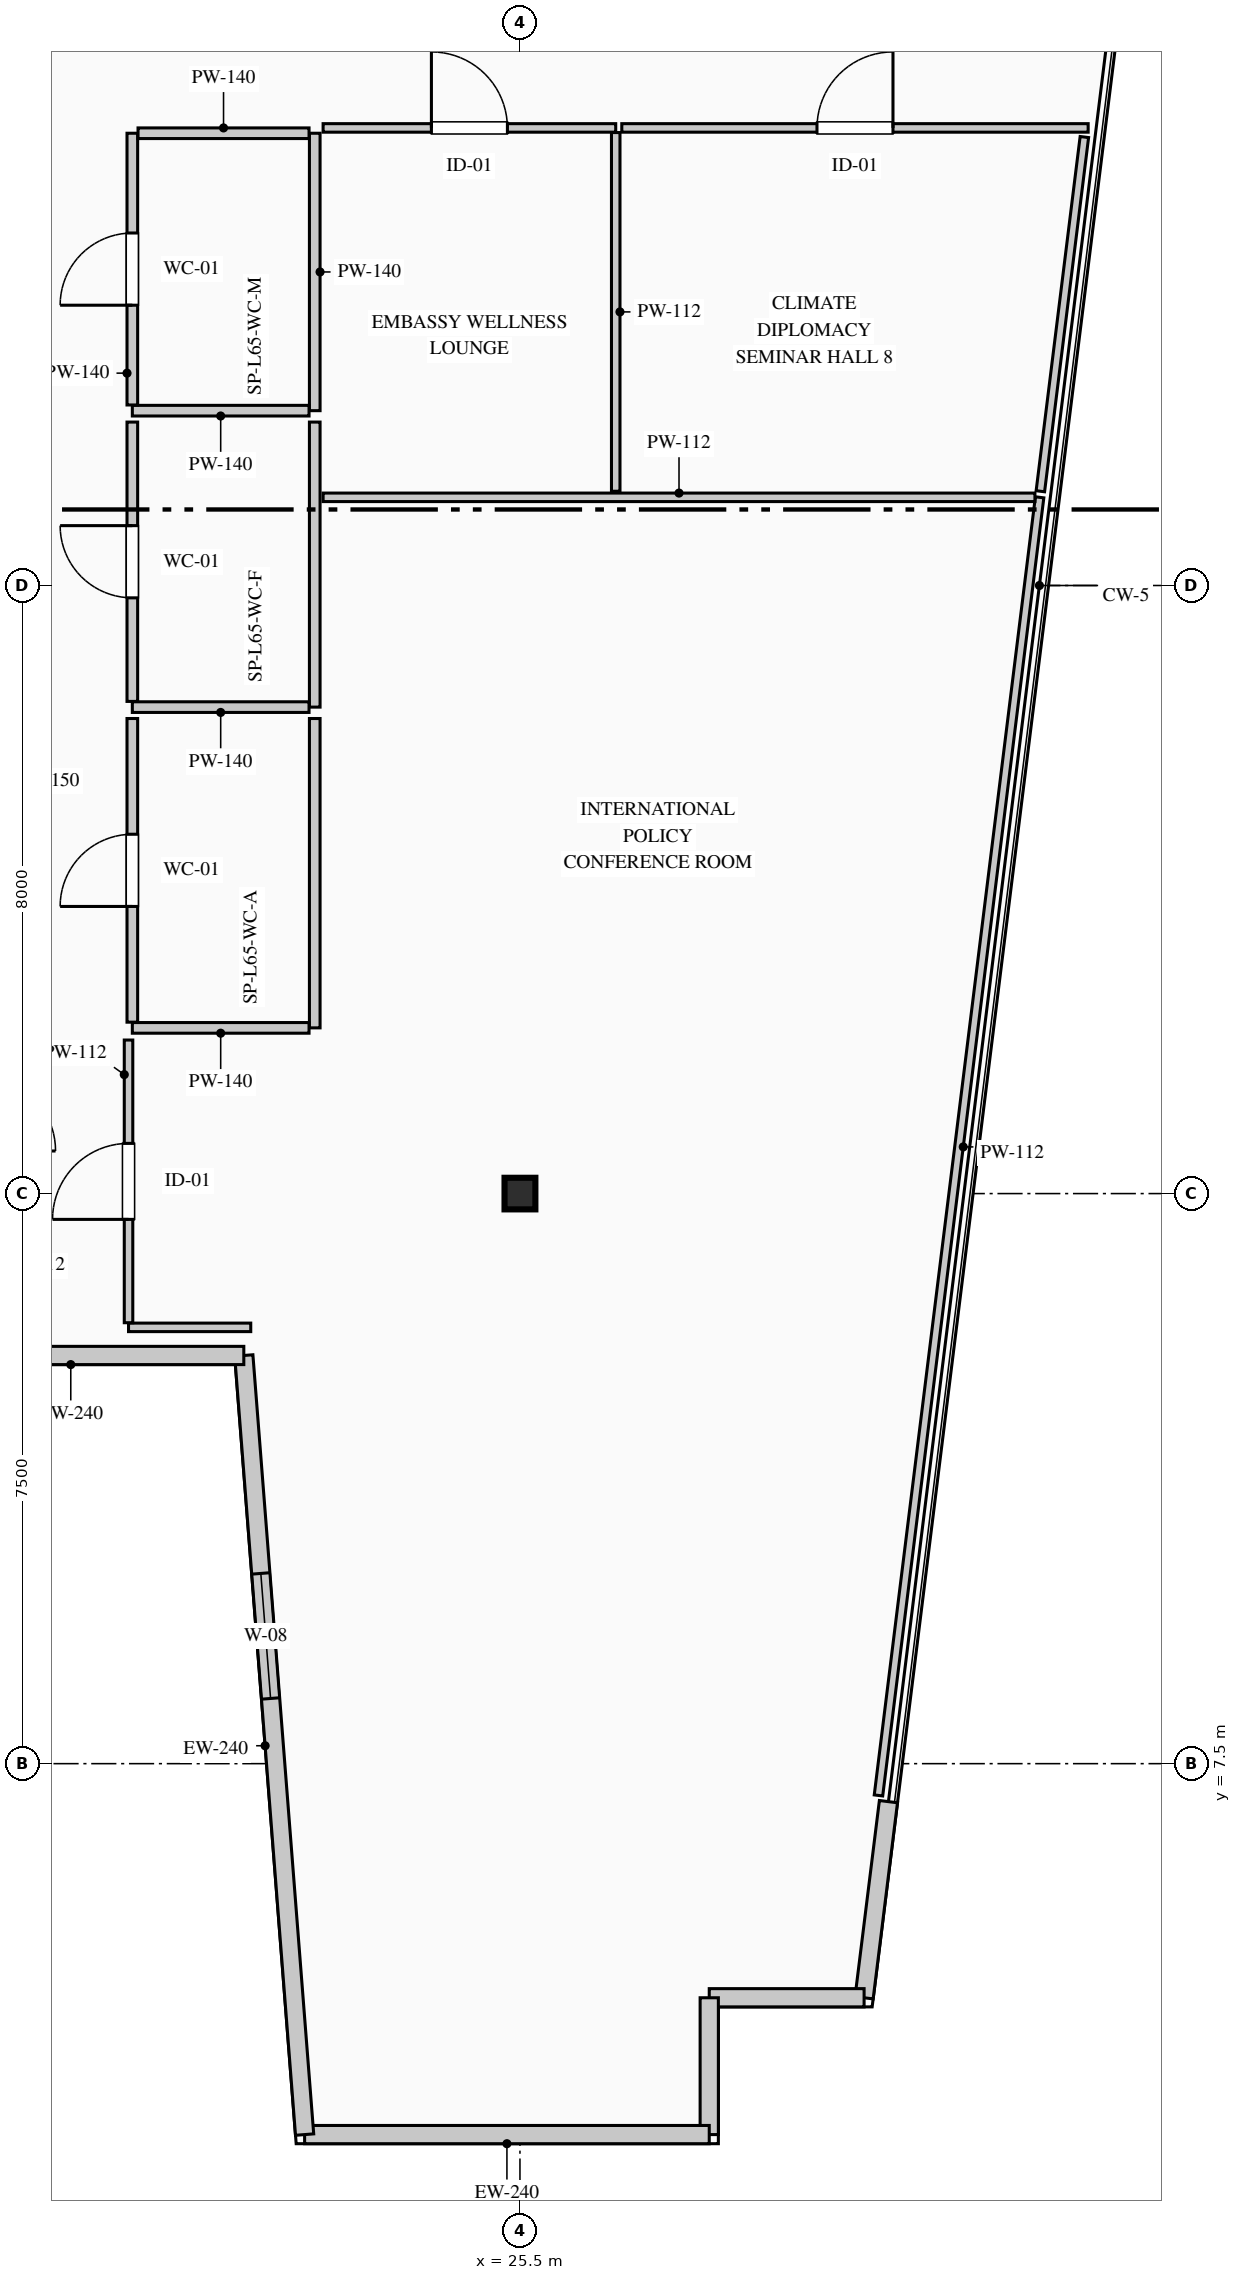
"""IFC4 building model, lengths in metres.
Left out: names, types, materials, properties, quantities, classifications, styles, units other than length and angle.
Written with IfcOpenShell. Run it as: python <this file> out.ifc"""

import sys

from ifc_helpers import new_model, si_unit, direction, frame, frame_2d, origin, origin_2d, place, context, subcontext, project, spatial, rectangle, i_section, extrude, element, fill, save


model = new_model("IFC4")
c1 = context("Model", 3, precision=1e-05, world=origin(), true_north=direction((0.0, 1.0)))
c2 = subcontext(c1, "Body", "Model", "MODEL_VIEW")
j1 = project(units=[si_unit("LENGTHUNIT", "METRE"), si_unit("PLANEANGLEUNIT", "RADIAN")], contexts=[c1])
p1 = place(None, origin())
s1 = spatial("IfcSite", under=j1, at=p1, CompositionType="ELEMENT")
p2 = place(p1, origin())
s2 = spatial("IfcBuilding", under=s1, at=p2, CompositionType="ELEMENT")
p3 = place(p2, frame((0.0, 0.0, 272.5)))
s3 = spatial("IfcBuildingStorey", under=s2, at=p3, CompositionType="ELEMENT", Elevation=272.5)
p4 = place(p3, frame((25.5, 15.0, 0.0), z_axis=(0.0, 0.0, 1.0), x_axis=(1.0, 0.0, 0.0)))
e1 = element("IfcColumn", 1, at=p4, inside=s3, PredefinedType="COLUMN", context=c2, shape_type="SweptSolid", body=[
    extrude(i_section(OverallWidth=0.406, OverallDepth=0.416, WebThickness=0.03, FlangeThickness=0.048, FilletRadius=0.015, at=origin_2d()), origin(), (0.0, 0.0, 1.0), 3.95),
])
p5 = place(p3, frame((30.348, 7.0, 0.0), z_axis=(0.0, 0.0, 1.0), x_axis=(-0.123191073593, -0.992382970121, 0.0)))
e2 = element("IfcWall", 2, at=p5, inside=s3, PredefinedType="STANDARD", context=c2, shape_type="SweptSolid", body=[
    extrude(rectangle(XDim=2.6, YDim=0.24, at=frame_2d((1.3, 0.0))), origin(), (0.0, 0.0, 1.0), 3.7),
])
p6 = place(p3, frame((30.028, 4.42, 0.0), z_axis=(0.0, 0.0, 1.0), x_axis=(-1.0, 0.0, 0.0)))
e3 = element("IfcWall", 3, at=p6, inside=s3, PredefinedType="STANDARD", context=c2, shape_type="SweptSolid", body=[
    extrude(rectangle(XDim=2.037, YDim=0.24, at=frame_2d((1.019, 0.0))), origin(), (0.0, 0.0, 1.0), 3.7),
])
p7 = place(p3, frame((27.99, 4.42, 0.0), z_axis=(0.0, 0.0, 1.0), x_axis=(0.0, -1.0, 0.0)))
e4 = element("IfcWall", 4, at=p7, inside=s3, PredefinedType="STANDARD", context=c2, shape_type="SweptSolid", body=[
    extrude(rectangle(XDim=1.8, YDim=0.24, at=frame_2d((0.9, 0.0))), origin(), (0.0, 0.0, 1.0), 3.7),
])
p8 = place(p3, frame((27.99, 2.62, 0.0), z_axis=(0.0, 0.0, 1.0), x_axis=(-1.0, 0.0, 0.0)))
e5 = element("IfcWall", 5, at=p8, inside=s3, PredefinedType="STANDARD", context=c2, shape_type="SweptSolid", body=[
    extrude(rectangle(XDim=5.324, YDim=0.24, at=frame_2d((2.662, 0.0))), origin(), (0.0, 0.0, 1.0), 3.7),
])
p9 = place(p3, frame((22.667, 2.62, 0.0), z_axis=(0.0, 0.0, 1.0), x_axis=(-0.077816860153, 0.996967670627, 0.0)))
e6 = element("IfcWall", 6, at=p9, inside=s3, PredefinedType="STANDARD", context=c2, shape_type="SweptSolid", body=[
    extrude(rectangle(XDim=10.281, YDim=0.24, at=frame_2d((5.141, 0.0))), origin(), (0.0, 0.0, 1.0), 3.7),
])
p10 = place(p9, frame((5.755, 0.0, 0.9)))
e7 = element("IfcOpeningElement", 7, at=p10, cuts=e6, PredefinedType="OPENING", context=c2, shape_type="SweptSolid", body=[
    extrude(rectangle(XDim=1.65, YDim=1.95, at=frame_2d((0.825, 0.975))), frame((0.0, 0.13, 0.0), z_axis=(0.0, -1.0, 0.0), x_axis=(1.0, 0.0, 0.0)), (0.0, 0.0, 1.0), 0.26),
])
p11 = place(p3, frame((21.867, 12.87, 0.0), z_axis=(0.0, 0.0, 1.0), x_axis=(-1.0, 0.0, 0.0)))
e8 = element("IfcWall", 8, at=p11, inside=s3, PredefinedType="STANDARD", context=c2, shape_type="SweptSolid", body=[
    extrude(rectangle(XDim=4.553, YDim=0.24, at=frame_2d((2.277, 0.0))), origin(), (0.0, 0.0, 1.0), 3.7),
])
p12 = place(p3, frame((22.8, 28.95, 0.0), z_axis=(0.0, 0.0, 1.0), x_axis=(0.0, -1.0, 0.0)))
e9 = element("IfcWall", 9, at=p12, inside=s3, PredefinedType="PARTITIONING", context=c2, shape_type="SweptSolid", body=[
    extrude(rectangle(XDim=3.65, YDim=0.14, at=frame_2d((1.825, 0.0))), origin(), (0.0, 0.0, 1.0), 3.285),
])
p13 = place(p3, frame((22.725, 25.3, 0.0), z_axis=(0.0, 0.0, 1.0), x_axis=(-1.0, 0.0, 0.0)))
e10 = element("IfcWall", 10, at=p13, inside=s3, PredefinedType="PARTITIONING", context=c2, shape_type="SweptSolid", body=[
    extrude(rectangle(XDim=2.325, YDim=0.14, at=frame_2d((1.163, 0.0))), origin(), (0.0, 0.0, 1.0), 3.7),
])
p14 = place(p3, frame((20.4, 25.375, 0.0), z_axis=(0.0, 0.0, 1.0), x_axis=(0.0, 1.0, 0.0)))
e11 = element("IfcWall", 11, at=p14, inside=s3, PredefinedType="PARTITIONING", context=c2, shape_type="SweptSolid", body=[
    extrude(rectangle(XDim=3.575, YDim=0.14, at=frame_2d((1.788, 0.0))), origin(), (0.0, 0.0, 1.0), 3.7),
])
p15 = place(p14, frame((1.312, 0.0, 0.0)))
e12 = element("IfcOpeningElement", 12, at=p15, cuts=e11, PredefinedType="OPENING", context=c2, shape_type="SweptSolid", body=[
    extrude(rectangle(XDim=0.95, YDim=2.15, at=frame_2d((0.475, 1.075))), frame((0.0, 0.08, 0.0), z_axis=(0.0, -1.0, 0.0), x_axis=(1.0, 0.0, 0.0)), (0.0, 0.0, 1.0), 0.16),
])
p16 = place(p3, frame((20.475, 28.95, 0.0), z_axis=(0.0, 0.0, 1.0), x_axis=(1.0, 0.0, 0.0)))
e13 = element("IfcWall", 13, at=p16, inside=s3, PredefinedType="PARTITIONING", context=c2, shape_type="SweptSolid", body=[
    extrude(rectangle(XDim=2.25, YDim=0.14, at=frame_2d((1.125, 0.0))), origin(), (0.0, 0.0, 1.0), 3.7),
])
p17 = place(p3, frame((22.8, 25.15, 0.0), z_axis=(0.0, 0.0, 1.0), x_axis=(0.0, -1.0, 0.0)))
e14 = element("IfcWall", 14, at=p17, inside=s3, PredefinedType="PARTITIONING", context=c2, shape_type="SweptSolid", body=[
    extrude(rectangle(XDim=3.75, YDim=0.14, at=frame_2d((1.875, 0.0))), origin(), (0.0, 0.0, 1.0), 3.285),
])
p18 = place(p3, frame((22.725, 21.4, 0.0), z_axis=(0.0, 0.0, 1.0), x_axis=(-1.0, 0.0, 0.0)))
e15 = element("IfcWall", 15, at=p18, inside=s3, PredefinedType="PARTITIONING", context=c2, shape_type="SweptSolid", body=[
    extrude(rectangle(XDim=2.325, YDim=0.14, at=frame_2d((1.163, 0.0))), origin(), (0.0, 0.0, 1.0), 3.7),
])
p19 = place(p3, frame((20.4, 21.475, 0.0), z_axis=(0.0, 0.0, 1.0), x_axis=(0.0, 1.0, 0.0)))
e16 = element("IfcWall", 16, at=p19, inside=s3, PredefinedType="PARTITIONING", context=c2, shape_type="SweptSolid", body=[
    extrude(rectangle(XDim=3.675, YDim=0.14, at=frame_2d((1.837, 0.0))), origin(), (0.0, 0.0, 1.0), 3.7),
])
p20 = place(p19, frame((1.363, 0.0, 0.0)))
e17 = element("IfcOpeningElement", 17, at=p20, cuts=e16, PredefinedType="OPENING", context=c2, shape_type="SweptSolid", body=[
    extrude(rectangle(XDim=0.95, YDim=2.15, at=frame_2d((0.475, 1.075))), frame((0.0, 0.08, 0.0), z_axis=(0.0, -1.0, 0.0), x_axis=(1.0, 0.0, 0.0)), (0.0, 0.0, 1.0), 0.16),
])
p21 = place(p3, frame((22.8, 21.25, 0.0), z_axis=(0.0, 0.0, 1.0), x_axis=(0.0, -1.0, 0.0)))
e18 = element("IfcWall", 18, at=p21, inside=s3, PredefinedType="PARTITIONING", context=c2, shape_type="SweptSolid", body=[
    extrude(rectangle(XDim=4.07, YDim=0.14, at=frame_2d((2.035, 0.0))), origin(), (0.0, 0.0, 1.0), 3.285),
])
p22 = place(p3, frame((22.725, 17.18, 0.0), z_axis=(0.0, 0.0, 1.0), x_axis=(-1.0, 0.0, 0.0)))
e19 = element("IfcWall", 19, at=p22, inside=s3, PredefinedType="PARTITIONING", context=c2, shape_type="SweptSolid", body=[
    extrude(rectangle(XDim=2.325, YDim=0.14, at=frame_2d((1.163, 0.0))), origin(), (0.0, 0.0, 1.0), 3.7),
])
p23 = place(p3, frame((20.4, 17.255, 0.0), z_axis=(0.0, 0.0, 1.0), x_axis=(0.0, 1.0, 0.0)))
e20 = element("IfcWall", 20, at=p23, inside=s3, PredefinedType="PARTITIONING", context=c2, shape_type="SweptSolid", body=[
    extrude(rectangle(XDim=3.995, YDim=0.14, at=frame_2d((1.998, 0.0))), origin(), (0.0, 0.0, 1.0), 3.7),
])
p24 = place(p23, frame((1.522, 0.0, 0.0)))
e21 = element("IfcOpeningElement", 21, at=p24, cuts=e20, PredefinedType="OPENING", context=c2, shape_type="SweptSolid", body=[
    extrude(rectangle(XDim=0.95, YDim=2.15, at=frame_2d((0.475, 1.075))), frame((0.0, 0.08, 0.0), z_axis=(0.0, -1.0, 0.0), x_axis=(1.0, 0.0, 0.0)), (0.0, 0.0, 1.0), 0.16),
])
p25 = place(p3, frame((32.337, 24.16, 0.0), z_axis=(0.0, 0.0, 1.0), x_axis=(-0.123182617282, -0.992384019823, 0.0)))
e22 = element("IfcWall", 22, at=p25, inside=s3, PredefinedType="PARTITIONING", context=c2, shape_type="SweptSolid", body=[
    extrude(rectangle(XDim=17.209, YDim=0.112, at=frame_2d((8.604, 0.0))), origin(), (0.0, 0.0, 1.0), 3.7),
])
p26 = place(p3, frame((21.958, 13.24, 0.0), z_axis=(0.0, 0.0, 1.0), x_axis=(-1.0, 0.0, 0.0)))
e23 = element("IfcWall", 23, at=p26, inside=s3, PredefinedType="PARTITIONING", context=c2, shape_type="SweptSolid", body=[
    extrude(rectangle(XDim=1.608, YDim=0.112, at=frame_2d((0.804, 0.0))), origin(), (0.0, 0.0, 1.0), 3.7),
])
p27 = place(p3, frame((20.35, 13.301, 0.0), z_axis=(0.0, 0.0, 1.0), x_axis=(0.0, 1.0, 0.0)))
e24 = element("IfcWall", 24, at=p27, inside=s3, PredefinedType="PARTITIONING", context=c2, shape_type="SweptSolid", body=[
    extrude(rectangle(XDim=3.719, YDim=0.112, at=frame_2d((1.859, 0.0))), origin(), (0.0, 0.0, 1.0), 3.7),
])
p28 = place(p27, frame((1.36, 0.0, 0.0)))
e25 = element("IfcOpeningElement", 25, at=p28, cuts=e24, PredefinedType="OPENING", context=c2, shape_type="SweptSolid", body=[
    extrude(rectangle(XDim=1.0, YDim=2.15, at=frame_2d((0.5, 1.075))), frame((0.0, 0.066, 0.0), z_axis=(0.0, -1.0, 0.0), x_axis=(1.0, 0.0, 0.0)), (0.0, 0.0, 1.0), 0.132),
])
p29 = place(p3, frame((22.91, 24.16, 0.0), z_axis=(0.0, 0.0, 1.0), x_axis=(1.0, 0.0, 0.0)))
e26 = element("IfcWall", 26, at=p29, inside=s3, PredefinedType="PARTITIONING", context=c2, shape_type="SweptSolid", body=[
    extrude(rectangle(XDim=9.365, YDim=0.112, at=frame_2d((4.683, 0.0))), origin(), (0.0, 0.0, 1.0), 3.7),
])
p30 = place(p3, frame((22.91, 29.02, 0.0), z_axis=(0.0, 0.0, 1.0), x_axis=(1.0, 0.0, 0.0)))
e27 = element("IfcWall", 27, at=p30, inside=s3, PredefinedType="PARTITIONING", context=c2, shape_type="SweptSolid", body=[
    extrude(rectangle(XDim=3.85, YDim=0.112, at=frame_2d((1.925, 0.0))), origin(), (0.0, 0.0, 1.0), 3.7),
])
p31 = place(p30, frame((1.425, 0.0, 0.0)))
e28 = element("IfcOpeningElement", 28, at=p31, cuts=e27, PredefinedType="OPENING", context=c2, shape_type="SweptSolid", body=[
    extrude(rectangle(XDim=1.0, YDim=2.15, at=frame_2d((0.5, 1.075))), frame((0.0, 0.066, 0.0), z_axis=(0.0, -1.0, 0.0), x_axis=(1.0, 0.0, 0.0)), (0.0, 0.0, 1.0), 0.132),
])
p32 = place(p3, frame((26.76, 28.959, 0.0), z_axis=(0.0, 0.0, 1.0), x_axis=(0.0, -1.0, 0.0)))
e29 = element("IfcWall", 29, at=p32, inside=s3, PredefinedType="PARTITIONING", context=c2, shape_type="SweptSolid", body=[
    extrude(rectangle(XDim=4.719, YDim=0.112, at=frame_2d((2.359, 0.0))), origin(), (0.0, 0.0, 1.0), 3.7),
])
p33 = place(p3, frame((26.84, 29.02, 0.0), z_axis=(0.0, 0.0, 1.0), x_axis=(1.0, 0.0, 0.0)))
e30 = element("IfcWall", 30, at=p33, inside=s3, PredefinedType="PARTITIONING", context=c2, shape_type="SweptSolid", body=[
    extrude(rectangle(XDim=6.136, YDim=0.112, at=frame_2d((3.068, 0.0))), origin(), (0.0, 0.0, 1.0), 3.7),
])
p34 = place(p33, frame((2.568, 0.0, 0.0)))
e31 = element("IfcOpeningElement", 31, at=p34, cuts=e30, PredefinedType="OPENING", context=c2, shape_type="SweptSolid", body=[
    extrude(rectangle(XDim=1.0, YDim=2.15, at=frame_2d((0.5, 1.075))), frame((0.0, 0.066, 0.0), z_axis=(0.0, -1.0, 0.0), x_axis=(1.0, 0.0, 0.0)), (0.0, 0.0, 1.0), 0.132),
])
p35 = place(p3, frame((32.926, 28.9, 0.0), z_axis=(0.0, 0.0, 1.0), x_axis=(-0.123324415608, -0.992366408397, 0.0)))
e32 = element("IfcWall", 32, at=p35, inside=s3, PredefinedType="PARTITIONING", context=c2, shape_type="SweptSolid", body=[
    extrude(rectangle(XDim=4.696, YDim=0.112, at=frame_2d((2.348, 0.0))), origin(), (0.0, 0.0, 1.0), 3.7),
])
p36 = place(p10, origin())
e33 = element("IfcWindow", 33, at=p36, inside=s3, PartitioningType="SINGLE_PANEL", PredefinedType="WINDOW", context=c2, shape_type="SweptSolid", body=[
    extrude(rectangle(XDim=1.65, YDim=1.95, at=frame_2d((0.825, 0.975))), frame((0.0, 0.03, 0.0), z_axis=(0.0, -1.0, 0.0), x_axis=(1.0, 0.0, 0.0)), (0.0, 0.0, 1.0), 0.06),
])
fill(e7, e33)
p37 = place(p15, origin())
e34 = element("IfcDoor", 34, at=p37, inside=s3, OperationType="SINGLE_SWING_LEFT", PredefinedType="DOOR", context=c2, shape_type="SweptSolid", body=[
    extrude(rectangle(XDim=0.95, YDim=2.15, at=frame_2d((0.475, 1.075))), frame((0.0, 0.025, 0.0), z_axis=(0.0, -1.0, 0.0), x_axis=(1.0, 0.0, 0.0)), (0.0, 0.0, 1.0), 0.05),
])
fill(e12, e34)
p38 = place(p20, origin())
e35 = element("IfcDoor", 35, at=p38, inside=s3, OperationType="SINGLE_SWING_RIGHT", PredefinedType="DOOR", context=c2, shape_type="SweptSolid", body=[
    extrude(rectangle(XDim=0.95, YDim=2.15, at=frame_2d((0.475, 1.075))), frame((0.0, 0.025, 0.0), z_axis=(0.0, -1.0, 0.0), x_axis=(1.0, 0.0, 0.0)), (0.0, 0.0, 1.0), 0.05),
])
fill(e17, e35)
p39 = place(p24, origin())
e36 = element("IfcDoor", 36, at=p39, inside=s3, OperationType="SINGLE_SWING_LEFT", PredefinedType="DOOR", context=c2, shape_type="SweptSolid", body=[
    extrude(rectangle(XDim=0.95, YDim=2.15, at=frame_2d((0.475, 1.075))), frame((0.0, 0.025, 0.0), z_axis=(0.0, -1.0, 0.0), x_axis=(1.0, 0.0, 0.0)), (0.0, 0.0, 1.0), 0.05),
])
fill(e21, e36)
p40 = place(p28, origin())
e37 = element("IfcDoor", 37, at=p40, inside=s3, OperationType="SINGLE_SWING_LEFT", PredefinedType="DOOR", context=c2, shape_type="SweptSolid", body=[
    extrude(rectangle(XDim=1.0, YDim=2.15, at=frame_2d((0.5, 1.075))), frame((0.0, 0.025, 0.0), z_axis=(0.0, -1.0, 0.0), x_axis=(1.0, 0.0, 0.0)), (0.0, 0.0, 1.0), 0.05),
])
fill(e25, e37)
p41 = place(p31, origin())
e38 = element("IfcDoor", 38, at=p41, inside=s3, OperationType="SINGLE_SWING_LEFT", PredefinedType="DOOR", context=c2, shape_type="SweptSolid", body=[
    extrude(rectangle(XDim=1.0, YDim=2.15, at=frame_2d((0.5, 1.075))), frame((0.0, 0.025, 0.0), z_axis=(0.0, -1.0, 0.0), x_axis=(1.0, 0.0, 0.0)), (0.0, 0.0, 1.0), 0.05),
])
fill(e28, e38)
p42 = place(p34, origin())
e39 = element("IfcDoor", 39, at=p42, inside=s3, OperationType="SINGLE_SWING_RIGHT", PredefinedType="DOOR", context=c2, shape_type="SweptSolid", body=[
    extrude(rectangle(XDim=1.0, YDim=2.15, at=frame_2d((0.5, 1.075))), frame((0.0, 0.025, 0.0), z_axis=(0.0, -1.0, 0.0), x_axis=(1.0, 0.0, 0.0)), (0.0, 0.0, 1.0), 0.05),
])
fill(e31, e39)
save(model, sys.argv[1])
